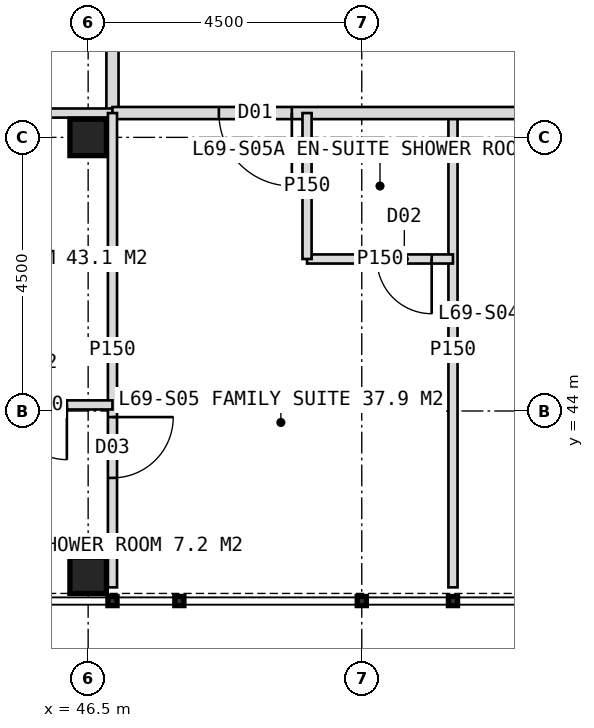
"""IFC4 building model, lengths in metres.
Left out: names, types, materials, properties, quantities, classifications, styles, units other than length and angle.
Written with IfcOpenShell. Run it as: python <this file> out.ifc"""

import sys

from ifc_helpers import new_model, si_unit, direction, frame, frame_2d, origin, origin_2d, place, context, subcontext, project, spatial, rectangle, hollow_rectangle, extrude, element, fill, save


model = new_model("IFC4")
c1 = context("Model", 3, precision=1e-05, world=origin(), true_north=direction((0.0, 1.0)))
c2 = subcontext(c1, "Body", "Model", "MODEL_VIEW")
j1 = project(units=[si_unit("LENGTHUNIT", "METRE"), si_unit("PLANEANGLEUNIT", "RADIAN")], contexts=[c1])
p1 = place(None, origin())
s1 = spatial("IfcSite", under=j1, at=p1, CompositionType="ELEMENT")
p2 = place(p1, origin())
s2 = spatial("IfcBuilding", under=s1, at=p2, CompositionType="ELEMENT")
p3 = place(p2, frame((0.0, 0.0, 286.0)))
s3 = spatial("IfcBuildingStorey", under=s2, at=p3, CompositionType="ELEMENT", Elevation=286.0)
for number, where, z_axis, x_axis in (
    (1, (46.5, 48.5, 0.0), (0.0, 0.0, 1.0), (1.0, 0.0, 0.0)),
    (2, (46.5, 41.3, 0.0), (0.0, 0.0, 1.0), (1.0, 0.0, 0.0)),
):
    element("IfcColumn", number, at=place(p3, frame(where, z_axis=z_axis, x_axis=x_axis)), inside=s3, PredefinedType="COLUMN", context=c2, shape_type="SweptSolid", body=[
        extrude(hollow_rectangle(XDim=0.6, YDim=0.6, WallThickness=0.04, at=origin_2d()), origin(), (0.0, 0.0, 1.0), 4.0),
    ])
p4 = place(p3, frame((46.9, 48.9, 0.0), z_axis=(0.0, 0.0, 1.0), x_axis=(0.0, 1.0, 0.0)))
e3 = element("IfcWall", 3, at=p4, inside=s3, PredefinedType="PARTITIONING", context=c2, shape_type="SweptSolid", body=[
    extrude(rectangle(XDim=26.2, YDim=0.2, at=frame_2d((13.1, 0.0))), origin(), (0.0, 0.0, 1.0), 3.75),
])
p5 = place(p4, frame((1.55, 0.0, 0.0)))
e4 = element("IfcOpeningElement", 4, at=p5, cuts=e3, PredefinedType="OPENING", context=c2, shape_type="SweptSolid", body=[
    extrude(rectangle(XDim=1.0, YDim=2.1, at=frame_2d((0.5, 1.05))), frame((0.0, 0.11, 0.0), z_axis=(0.0, -1.0, 0.0), x_axis=(1.0, 0.0, 0.0)), (0.0, 0.0, 1.0), 0.22),
])
p6 = place(p4, frame((6.6, 0.0, 0.0)))
e5 = element("IfcOpeningElement", 5, at=p6, cuts=e3, PredefinedType="OPENING", context=c2, shape_type="SweptSolid", body=[
    extrude(rectangle(XDim=1.0, YDim=2.1, at=frame_2d((0.5, 1.05))), frame((0.0, 0.11, 0.0), z_axis=(0.0, -1.0, 0.0), x_axis=(1.0, 0.0, 0.0)), (0.0, 0.0, 1.0), 0.22),
])
p7 = place(p4, frame((11.1, 0.0, 0.0)))
e6 = element("IfcOpeningElement", 6, at=p7, cuts=e3, PredefinedType="OPENING", context=c2, shape_type="SweptSolid", body=[
    extrude(rectangle(XDim=1.0, YDim=2.1, at=frame_2d((0.5, 1.05))), frame((0.0, 0.11, 0.0), z_axis=(0.0, -1.0, 0.0), x_axis=(1.0, 0.0, 0.0)), (0.0, 0.0, 1.0), 0.22),
])
p8 = place(p4, frame((18.45, 0.0, 0.0)))
e7 = element("IfcOpeningElement", 7, at=p8, cuts=e3, PredefinedType="OPENING", context=c2, shape_type="SweptSolid", body=[
    extrude(rectangle(XDim=1.2, YDim=2.2, at=frame_2d((0.6, 1.1))), frame((0.0, 0.11, 0.0), z_axis=(0.0, -1.0, 0.0), x_axis=(1.0, 0.0, 0.0)), (0.0, 0.0, 1.0), 0.22),
])
p9 = place(p4, frame((22.9, 0.0, 0.0)))
e8 = element("IfcOpeningElement", 8, at=p9, cuts=e3, PredefinedType="OPENING", context=c2, shape_type="SweptSolid", body=[
    extrude(rectangle(XDim=1.0, YDim=2.1, at=frame_2d((0.5, 1.05))), frame((0.0, 0.11, 0.0), z_axis=(0.0, -1.0, 0.0), x_axis=(1.0, 0.0, 0.0)), (0.0, 0.0, 1.0), 0.22),
])
for number, where, z_axis, x_axis in (
    (9, (46.9, 48.9, 0.0), (0.0, 0.0, 1.0), (-1.0, 0.0, 0.0)),
    (10, (52.5, 48.9, 0.0), (0.0, 0.0, 1.0), (0.0, -1.0, 0.0)),
):
    element("IfcWall", number, at=place(p3, frame(where, z_axis=z_axis, x_axis=x_axis)), inside=s3, PredefinedType="PARTITIONING", context=c2, shape_type="SweptSolid", body=[
        extrude(rectangle(XDim=7.8, YDim=0.15, at=frame_2d((3.9, 0.0))), origin(), (0.0, 0.0, 1.0), 3.75),
    ])
p10 = place(p3, frame((73.1, 48.9, 0.0), z_axis=(0.0, 0.0, 1.0), x_axis=(-1.0, 0.0, 0.0)))
e11 = element("IfcWall", 11, at=p10, inside=s3, PredefinedType="PARTITIONING", context=c2, shape_type="SweptSolid", body=[
    extrude(rectangle(XDim=26.2, YDim=0.2, at=frame_2d((13.1, 0.0))), origin(), (0.0, 0.0, 1.0), 3.75),
])
p11 = place(p10, frame((1.75, 0.0, 0.0)))
e12 = element("IfcOpeningElement", 12, at=p11, cuts=e11, PredefinedType="OPENING", context=c2, shape_type="SweptSolid", body=[
    extrude(rectangle(XDim=1.2, YDim=2.2, at=frame_2d((0.6, 1.1))), frame((0.0, 0.11, 0.0), z_axis=(0.0, -1.0, 0.0), x_axis=(1.0, 0.0, 0.0)), (0.0, 0.0, 1.0), 0.22),
])
p12 = place(p10, frame((6.75, 0.0, 0.0)))
e13 = element("IfcOpeningElement", 13, at=p12, cuts=e11, PredefinedType="OPENING", context=c2, shape_type="SweptSolid", body=[
    extrude(rectangle(XDim=1.0, YDim=2.1, at=frame_2d((0.5, 1.05))), frame((0.0, 0.11, 0.0), z_axis=(0.0, -1.0, 0.0), x_axis=(1.0, 0.0, 0.0)), (0.0, 0.0, 1.0), 0.22),
])
p13 = place(p10, frame((11.85, 0.0, 0.0)))
e14 = element("IfcOpeningElement", 14, at=p13, cuts=e11, PredefinedType="OPENING", context=c2, shape_type="SweptSolid", body=[
    extrude(rectangle(XDim=1.0, YDim=2.1, at=frame_2d((0.5, 1.05))), frame((0.0, 0.11, 0.0), z_axis=(0.0, -1.0, 0.0), x_axis=(1.0, 0.0, 0.0)), (0.0, 0.0, 1.0), 0.22),
])
p14 = place(p10, frame((15.75, 0.0, 0.0)))
e15 = element("IfcOpeningElement", 15, at=p14, cuts=e11, PredefinedType="OPENING", context=c2, shape_type="SweptSolid", body=[
    extrude(rectangle(XDim=1.0, YDim=2.1, at=frame_2d((0.5, 1.05))), frame((0.0, 0.11, 0.0), z_axis=(0.0, -1.0, 0.0), x_axis=(1.0, 0.0, 0.0)), (0.0, 0.0, 1.0), 0.22),
])
p15 = place(p10, frame((23.25, 0.0, 0.0)))
e16 = element("IfcOpeningElement", 16, at=p15, cuts=e11, PredefinedType="OPENING", context=c2, shape_type="SweptSolid", body=[
    extrude(rectangle(XDim=1.2, YDim=2.2, at=frame_2d((0.6, 1.1))), frame((0.0, 0.11, 0.0), z_axis=(0.0, -1.0, 0.0), x_axis=(1.0, 0.0, 0.0)), (0.0, 0.0, 1.0), 0.22),
])
p16 = place(p3, frame((46.9, 48.9, 0.0), z_axis=(0.0, 0.0, 1.0), x_axis=(0.0, -1.0, 0.0)))
e17 = element("IfcWall", 17, at=p16, inside=s3, PredefinedType="PARTITIONING", context=c2, shape_type="SweptSolid", body=[
    extrude(rectangle(XDim=7.8, YDim=0.15, at=frame_2d((3.9, 0.0))), origin(), (0.0, 0.0, 1.0), 3.75),
])
p17 = place(p16, frame((5.0, 0.0, 0.0)))
e18 = element("IfcOpeningElement", 18, at=p17, cuts=e17, PredefinedType="OPENING", context=c2, shape_type="SweptSolid", body=[
    extrude(rectangle(XDim=1.0, YDim=2.1, at=frame_2d((0.5, 1.05))), frame((0.0, 0.085, 0.0), z_axis=(0.0, -1.0, 0.0), x_axis=(1.0, 0.0, 0.0)), (0.0, 0.0, 1.0), 0.17),
])
p18 = place(p3, frame((46.9, 44.1, 0.0), z_axis=(0.0, 0.0, 1.0), x_axis=(-1.0, 0.0, 0.0)))
e19 = element("IfcWall", 19, at=p18, inside=s3, PredefinedType="PARTITIONING", context=c2, shape_type="SweptSolid", body=[
    extrude(rectangle(XDim=2.4, YDim=0.15, at=frame_2d((1.2, 0.0))), origin(), (0.0, 0.0, 1.0), 3.75),
])
p19 = place(p18, frame((0.75, 0.0, 0.0)))
e20 = element("IfcOpeningElement", 20, at=p19, cuts=e19, PredefinedType="OPENING", context=c2, shape_type="SweptSolid", body=[
    extrude(rectangle(XDim=0.9, YDim=2.1, at=frame_2d((0.45, 1.05))), frame((0.0, 0.085, 0.0), z_axis=(0.0, -1.0, 0.0), x_axis=(1.0, 0.0, 0.0)), (0.0, 0.0, 1.0), 0.17),
])
p20 = place(p3, frame((52.5, 46.5, 0.0), z_axis=(0.0, 0.0, 1.0), x_axis=(-1.0, 0.0, 0.0)))
e21 = element("IfcWall", 21, at=p20, inside=s3, PredefinedType="PARTITIONING", context=c2, shape_type="SweptSolid", body=[
    extrude(rectangle(XDim=2.4, YDim=0.15, at=frame_2d((1.2, 0.0))), origin(), (0.0, 0.0, 1.0), 3.75),
])
p21 = place(p20, frame((0.35, 0.0, 0.0)))
e22 = element("IfcOpeningElement", 22, at=p21, cuts=e21, PredefinedType="OPENING", context=c2, shape_type="SweptSolid", body=[
    extrude(rectangle(XDim=0.9, YDim=2.1, at=frame_2d((0.45, 1.05))), frame((0.0, 0.085, 0.0), z_axis=(0.0, -1.0, 0.0), x_axis=(1.0, 0.0, 0.0)), (0.0, 0.0, 1.0), 0.17),
])
p22 = place(p3, frame((50.1, 48.9, 0.0), z_axis=(0.0, 0.0, 1.0), x_axis=(0.0, -1.0, 0.0)))
e23 = element("IfcWall", 23, at=p22, inside=s3, PredefinedType="PARTITIONING", context=c2, shape_type="SweptSolid", body=[
    extrude(rectangle(XDim=2.4, YDim=0.15, at=frame_2d((1.2, 0.0))), origin(), (0.0, 0.0, 1.0), 3.75),
])
p23 = place(p19, origin())
e24 = element("IfcDoor", 24, at=p23, inside=s3, OperationType="SINGLE_SWING_LEFT", PredefinedType="DOOR", context=c2, shape_type="SweptSolid", body=[
    extrude(rectangle(XDim=0.9, YDim=2.1, at=frame_2d((0.45, 1.05))), frame((0.0, 0.025, 0.0), z_axis=(0.0, -1.0, 0.0), x_axis=(1.0, 0.0, 0.0)), (0.0, 0.0, 1.0), 0.05),
])
fill(e20, e24)
p24 = place(p17, origin())
e25 = element("IfcDoor", 25, at=p24, inside=s3, OperationType="SINGLE_SWING_LEFT", PredefinedType="DOOR", context=c2, shape_type="SweptSolid", body=[
    extrude(rectangle(XDim=1.0, YDim=2.1, at=frame_2d((0.5, 1.05))), frame((0.0, 0.025, 0.0), z_axis=(0.0, -1.0, 0.0), x_axis=(1.0, 0.0, 0.0)), (0.0, 0.0, 1.0), 0.05),
])
fill(e18, e25)
p25 = place(p15, origin())
e26 = element("IfcDoor", 26, at=p25, inside=s3, OperationType="SINGLE_SWING_LEFT", PredefinedType="DOOR", context=c2, shape_type="SweptSolid", body=[
    extrude(rectangle(XDim=1.2, YDim=2.2, at=frame_2d((0.6, 1.1))), frame((0.0, 0.025, 0.0), z_axis=(0.0, -1.0, 0.0), x_axis=(1.0, 0.0, 0.0)), (0.0, 0.0, 1.0), 0.05),
])
fill(e16, e26)
p26 = place(p21, origin())
e27 = element("IfcDoor", 27, at=p26, inside=s3, OperationType="SINGLE_SWING_LEFT", PredefinedType="DOOR", context=c2, shape_type="SweptSolid", body=[
    extrude(rectangle(XDim=0.9, YDim=2.1, at=frame_2d((0.45, 1.05))), frame((0.0, 0.025, 0.0), z_axis=(0.0, -1.0, 0.0), x_axis=(1.0, 0.0, 0.0)), (0.0, 0.0, 1.0), 0.05),
])
fill(e22, e27)
save(model, sys.argv[1])
